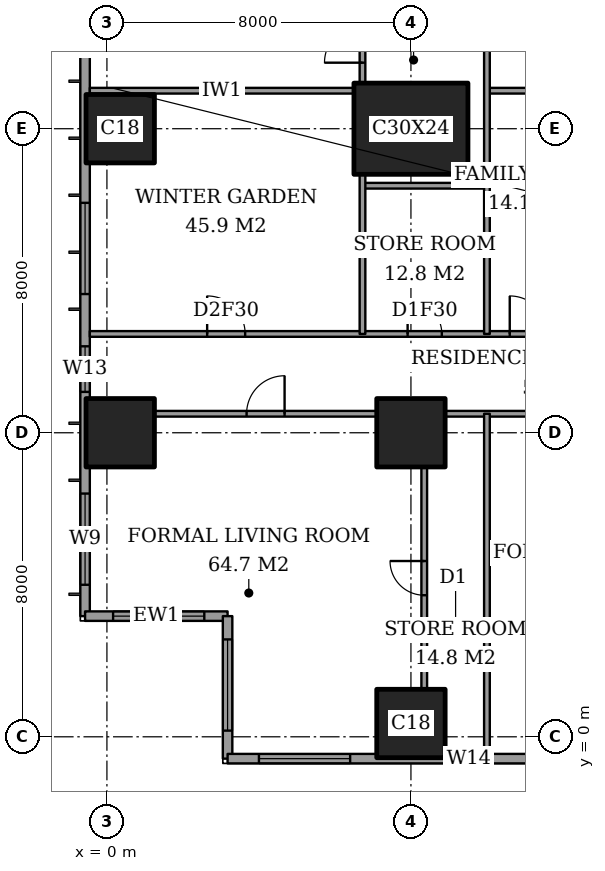
"""IFC4 building model, lengths in metres.
Left out: names, types, materials, properties, quantities, classifications, styles, units other than length and angle.
Written with IfcOpenShell. Run it as: python <this file> out.ifc"""

import sys

from ifc_helpers import new_model, si_unit, direction, frame, frame_2d, origin, origin_2d, place, context, subcontext, project, spatial, rectangle, extrude, element, fill, save


model = new_model("IFC4")
c1 = context("Model", 3, precision=1e-05, world=origin(), true_north=direction((0.0, 1.0)))
c2 = subcontext(c1, "Body", "Model", "MODEL_VIEW")
j1 = project(units=[si_unit("LENGTHUNIT", "METRE"), si_unit("PLANEANGLEUNIT", "RADIAN")], contexts=[c1])
p1 = place(None, origin())
s1 = spatial("IfcSite", under=j1, at=p1, CompositionType="ELEMENT")
p2 = place(p1, origin())
s2 = spatial("IfcBuilding", under=s1, at=p2, CompositionType="ELEMENT")
p3 = place(p2, frame((0.0, 0.0, 203.8)))
s3 = spatial("IfcBuildingStorey", under=s2, at=p3, CompositionType="ELEMENT", Elevation=203.8)
for number, where, z_axis, x_axis in (
    (1, (0.35, 8.0, 0.0), (0.0, 0.0, 1.0), (1.0, 0.0, 0.0)),
    (2, (0.35, 16.0, 0.0), (0.0, 0.0, 1.0), (1.0, 0.0, 0.0)),
    (3, (8.0, 0.35, 0.0), (0.0, 0.0, 1.0), (1.0, 0.0, 0.0)),
    (4, (8.0, 8.0, 0.0), (0.0, 0.0, 1.0), (1.0, 0.0, 0.0)),
):
    element("IfcColumn", number, at=place(p3, frame(where, z_axis=z_axis, x_axis=x_axis)), inside=s3, PredefinedType="COLUMN", context=c2, shape_type="SweptSolid", body=[
        extrude(rectangle(XDim=1.8, YDim=1.8, at=origin_2d()), origin(), (0.0, 0.0, 1.0), 3.6),
    ])
p4 = place(p3, frame((8.0, 16.0, 0.0), z_axis=(0.0, 0.0, 1.0), x_axis=(1.0, 0.0, 0.0)))
e5 = element("IfcColumn", 5, at=p4, inside=s3, PredefinedType="COLUMN", context=c2, shape_type="SweptSolid", body=[
    extrude(rectangle(XDim=3.0, YDim=2.4, at=origin_2d()), origin(), (0.0, 0.0, 1.0), 3.6),
])
p5 = place(p3, frame((-0.575, 44.825, 0.0), z_axis=(0.0, 0.0, 1.0), x_axis=(0.0, -1.0, 0.0)))
e6 = element("IfcWall", 6, at=p5, inside=s3, PredefinedType="SOLIDWALL", context=c2, shape_type="SweptSolid", body=[
    extrude(rectangle(XDim=41.65, YDim=0.25, at=frame_2d((20.825, 0.0))), origin(), (0.0, 0.0, 1.0), 3.6),
])
p6 = place(p5, frame((0.825, 0.0, 0.2)))
e7 = element("IfcOpeningElement", 7, at=p6, cuts=e6, PredefinedType="OPENING", context=c2, shape_type="SweptSolid", body=[
    extrude(rectangle(XDim=2.4, YDim=2.4, at=frame_2d((1.2, 1.2))), frame((0.0, 0.135, 0.0), z_axis=(0.0, -1.0, 0.0), x_axis=(1.0, 0.0, 0.0)), (0.0, 0.0, 1.0), 0.27),
])
p7 = place(p5, frame((6.075, 0.0, 0.2)))
e8 = element("IfcOpeningElement", 8, at=p7, cuts=e6, PredefinedType="OPENING", context=c2, shape_type="SweptSolid", body=[
    extrude(rectangle(XDim=1.2, YDim=2.4, at=frame_2d((0.6, 1.2))), frame((0.0, 0.135, 0.0), z_axis=(0.0, -1.0, 0.0), x_axis=(1.0, 0.0, 0.0)), (0.0, 0.0, 1.0), 0.27),
])
p8 = place(p5, frame((8.575, 0.0, 0.2)))
e9 = element("IfcOpeningElement", 9, at=p8, cuts=e6, PredefinedType="OPENING", context=c2, shape_type="SweptSolid", body=[
    extrude(rectangle(XDim=2.4, YDim=2.4, at=frame_2d((1.2, 1.2))), frame((0.0, 0.135, 0.0), z_axis=(0.0, -1.0, 0.0), x_axis=(1.0, 0.0, 0.0)), (0.0, 0.0, 1.0), 0.27),
])
p9 = place(p5, frame((15.675, 0.0, 0.2)))
e10 = element("IfcOpeningElement", 10, at=p9, cuts=e6, PredefinedType="OPENING", context=c2, shape_type="SweptSolid", body=[
    extrude(rectangle(XDim=2.4, YDim=2.4, at=frame_2d((1.2, 1.2))), frame((0.0, 0.135, 0.0), z_axis=(0.0, -1.0, 0.0), x_axis=(1.0, 0.0, 0.0)), (0.0, 0.0, 1.0), 0.27),
])
p10 = place(p5, frame((23.575, 0.0, 0.2)))
e11 = element("IfcOpeningElement", 11, at=p10, cuts=e6, PredefinedType="OPENING", context=c2, shape_type="SweptSolid", body=[
    extrude(rectangle(XDim=2.4, YDim=2.4, at=frame_2d((1.2, 1.2))), frame((0.0, 0.135, 0.0), z_axis=(0.0, -1.0, 0.0), x_axis=(1.0, 0.0, 0.0)), (0.0, 0.0, 1.0), 0.27),
])
p11 = place(p5, frame((30.775, 0.0, 0.2)))
e12 = element("IfcOpeningElement", 12, at=p11, cuts=e6, PredefinedType="OPENING", context=c2, shape_type="SweptSolid", body=[
    extrude(rectangle(XDim=2.4, YDim=2.4, at=frame_2d((1.2, 1.2))), frame((0.0, 0.135, 0.0), z_axis=(0.0, -1.0, 0.0), x_axis=(1.0, 0.0, 0.0)), (0.0, 0.0, 1.0), 0.27),
])
p12 = place(p5, frame((34.55, 0.0, 0.2)))
e13 = element("IfcOpeningElement", 13, at=p12, cuts=e6, PredefinedType="OPENING", context=c2, shape_type="SweptSolid", body=[
    extrude(rectangle(XDim=1.2, YDim=2.4, at=frame_2d((0.6, 1.2))), frame((0.0, 0.135, 0.0), z_axis=(0.0, -1.0, 0.0), x_axis=(1.0, 0.0, 0.0)), (0.0, 0.0, 1.0), 0.27),
])
p13 = place(p5, frame((38.425, 0.0, 0.2)))
e14 = element("IfcOpeningElement", 14, at=p13, cuts=e6, PredefinedType="OPENING", context=c2, shape_type="SweptSolid", body=[
    extrude(rectangle(XDim=2.4, YDim=2.4, at=frame_2d((1.2, 1.2))), frame((0.0, 0.135, 0.0), z_axis=(0.0, -1.0, 0.0), x_axis=(1.0, 0.0, 0.0)), (0.0, 0.0, 1.0), 0.27),
])
p14 = place(p3, frame((-0.575, 3.175, 0.0), z_axis=(0.0, 0.0, 1.0), x_axis=(1.0, 0.0, 0.0)))
e15 = element("IfcWall", 15, at=p14, inside=s3, PredefinedType="SOLIDWALL", context=c2, shape_type="SweptSolid", body=[
    extrude(rectangle(XDim=3.75, YDim=0.25, at=frame_2d((1.875, 0.0))), origin(), (0.0, 0.0, 1.0), 3.6),
])
p15 = place(p14, frame((0.738, 0.0, 0.2)))
e16 = element("IfcOpeningElement", 16, at=p15, cuts=e15, PredefinedType="OPENING", context=c2, shape_type="SweptSolid", body=[
    extrude(rectangle(XDim=2.4, YDim=2.4, at=frame_2d((1.2, 1.2))), frame((0.0, 0.135, 0.0), z_axis=(0.0, -1.0, 0.0), x_axis=(1.0, 0.0, 0.0)), (0.0, 0.0, 1.0), 0.27),
])
p16 = place(p3, frame((3.175, 3.175, 0.0), z_axis=(0.0, 0.0, 1.0), x_axis=(0.0, -1.0, 0.0)))
e17 = element("IfcWall", 17, at=p16, inside=s3, PredefinedType="SOLIDWALL", context=c2, shape_type="SweptSolid", body=[
    extrude(rectangle(XDim=3.75, YDim=0.25, at=frame_2d((1.875, 0.0))), origin(), (0.0, 0.0, 1.0), 3.6),
])
p17 = place(p16, frame((0.613, 0.0, 0.2)))
e18 = element("IfcOpeningElement", 18, at=p17, cuts=e17, PredefinedType="OPENING", context=c2, shape_type="SweptSolid", body=[
    extrude(rectangle(XDim=2.4, YDim=2.4, at=frame_2d((1.2, 1.2))), frame((0.0, 0.135, 0.0), z_axis=(0.0, -1.0, 0.0), x_axis=(1.0, 0.0, 0.0)), (0.0, 0.0, 1.0), 0.27),
])
p18 = place(p3, frame((3.175, -0.575, 0.0), z_axis=(0.0, 0.0, 1.0), x_axis=(1.0, 0.0, 0.0)))
e19 = element("IfcWall", 19, at=p18, inside=s3, PredefinedType="SOLIDWALL", context=c2, shape_type="SweptSolid", body=[
    extrude(rectangle(XDim=21.4, YDim=0.25, at=frame_2d((10.7, 0.0))), origin(), (0.0, 0.0, 1.0), 3.6),
])
p19 = place(p18, frame((0.825, 0.0, 0.2)))
e20 = element("IfcOpeningElement", 20, at=p19, cuts=e19, PredefinedType="OPENING", context=c2, shape_type="SweptSolid", body=[
    extrude(rectangle(XDim=2.4, YDim=2.4, at=frame_2d((1.2, 1.2))), frame((0.0, 0.135, 0.0), z_axis=(0.0, -1.0, 0.0), x_axis=(1.0, 0.0, 0.0)), (0.0, 0.0, 1.0), 0.27),
])
p20 = place(p18, frame((6.05, 0.0, 0.2)))
e21 = element("IfcOpeningElement", 21, at=p20, cuts=e19, PredefinedType="OPENING", context=c2, shape_type="SweptSolid", body=[
    extrude(rectangle(XDim=0.6, YDim=2.4, at=frame_2d((0.3, 1.2))), frame((0.0, 0.135, 0.0), z_axis=(0.0, -1.0, 0.0), x_axis=(1.0, 0.0, 0.0)), (0.0, 0.0, 1.0), 0.27),
])
p21 = place(p18, frame((8.175, 0.0, 0.2)))
e22 = element("IfcOpeningElement", 22, at=p21, cuts=e19, PredefinedType="OPENING", context=c2, shape_type="SweptSolid", body=[
    extrude(rectangle(XDim=2.4, YDim=2.4, at=frame_2d((1.2, 1.2))), frame((0.0, 0.135, 0.0), z_axis=(0.0, -1.0, 0.0), x_axis=(1.0, 0.0, 0.0)), (0.0, 0.0, 1.0), 0.27),
])
p22 = place(p18, frame((14.525, 0.0, 0.2)))
e23 = element("IfcOpeningElement", 23, at=p22, cuts=e19, PredefinedType="OPENING", context=c2, shape_type="SweptSolid", body=[
    extrude(rectangle(XDim=1.2, YDim=2.4, at=frame_2d((0.6, 1.2))), frame((0.0, 0.135, 0.0), z_axis=(0.0, -1.0, 0.0), x_axis=(1.0, 0.0, 0.0)), (0.0, 0.0, 1.0), 0.27),
])
p23 = place(p18, frame((17.4, 0.0, 0.2)))
e24 = element("IfcOpeningElement", 24, at=p23, cuts=e19, PredefinedType="OPENING", context=c2, shape_type="SweptSolid", body=[
    extrude(rectangle(XDim=1.2, YDim=2.4, at=frame_2d((0.6, 1.2))), frame((0.0, 0.135, 0.0), z_axis=(0.0, -1.0, 0.0), x_axis=(1.0, 0.0, 0.0)), (0.0, 0.0, 1.0), 0.27),
])
p24 = place(p3, frame((1.25, 8.5, 0.0), z_axis=(0.0, 0.0, 1.0), x_axis=(1.0, 0.0, 0.0)))
e25 = element("IfcWall", 25, at=p24, inside=s3, PredefinedType="PARTITIONING", context=c2, shape_type="SweptSolid", body=[
    extrude(rectangle(XDim=5.85, YDim=0.15, at=frame_2d((2.925, 0.0))), origin(), (0.0, 0.0, 1.0), 3.35),
])
p25 = place(p24, frame((2.425, 0.0, 0.0)))
e26 = element("IfcOpeningElement", 26, at=p25, cuts=e25, PredefinedType="OPENING", context=c2, shape_type="SweptSolid", body=[
    extrude(rectangle(XDim=1.0, YDim=2.1, at=frame_2d((0.5, 1.05))), frame((0.0, 0.085, 0.0), z_axis=(0.0, -1.0, 0.0), x_axis=(1.0, 0.0, 0.0)), (0.0, 0.0, 1.0), 0.17),
])
p26 = place(p3, frame((8.9, 8.5, 0.0), z_axis=(0.0, 0.0, 1.0), x_axis=(1.0, 0.0, 0.0)))
e27 = element("IfcWall", 27, at=p26, inside=s3, PredefinedType="PARTITIONING", context=c2, shape_type="SweptSolid", body=[
    extrude(rectangle(XDim=6.2, YDim=0.15, at=frame_2d((3.1, 0.0))), origin(), (0.0, 0.0, 1.0), 3.35),
])
p27 = place(p26, frame((3.15, 0.0, 0.0)))
e28 = element("IfcOpeningElement", 28, at=p27, cuts=e27, PredefinedType="OPENING", context=c2, shape_type="SweptSolid", body=[
    extrude(rectangle(XDim=1.0, YDim=2.1, at=frame_2d((0.5, 1.05))), frame((0.0, 0.085, 0.0), z_axis=(0.0, -1.0, 0.0), x_axis=(1.0, 0.0, 0.0)), (0.0, 0.0, 1.0), 0.17),
])
p28 = place(p3, frame((-0.45, 10.6, 0.0), z_axis=(0.0, 0.0, 1.0), x_axis=(1.0, 0.0, 0.0)))
e29 = element("IfcWall", 29, at=p28, inside=s3, PredefinedType="PARTITIONING", context=c2, shape_type="SweptSolid", body=[
    extrude(rectangle(XDim=25.011, YDim=0.15, at=frame_2d((12.505, 0.0))), origin(), (0.0, 0.0, 1.0), 3.35),
])
p29 = place(p28, frame((13.25, 0.0, 0.0)))
e30 = element("IfcOpeningElement", 30, at=p29, cuts=e29, PredefinedType="OPENING", context=c2, shape_type="SweptSolid", body=[
    extrude(rectangle(XDim=1.0, YDim=2.1, at=frame_2d((0.5, 1.05))), frame((0.0, 0.085, 0.0), z_axis=(0.0, -1.0, 0.0), x_axis=(1.0, 0.0, 0.0)), (0.0, 0.0, 1.0), 0.17),
])
p30 = place(p28, frame((3.087, 0.0, 0.0)))
e31 = element("IfcOpeningElement", 31, at=p30, cuts=e29, PredefinedType="OPENING", context=c2, shape_type="SweptSolid", body=[
    extrude(rectangle(XDim=1.0, YDim=2.1, at=frame_2d((0.5, 1.05))), frame((0.0, 0.085, 0.0), z_axis=(0.0, -1.0, 0.0), x_axis=(1.0, 0.0, 0.0)), (0.0, 0.0, 1.0), 0.17),
])
p31 = place(p28, frame((8.363, 0.0, 0.0)))
e32 = element("IfcOpeningElement", 32, at=p31, cuts=e29, PredefinedType="OPENING", context=c2, shape_type="SweptSolid", body=[
    extrude(rectangle(XDim=0.9, YDim=2.1, at=frame_2d((0.45, 1.05))), frame((0.0, 0.085, 0.0), z_axis=(0.0, -1.0, 0.0), x_axis=(1.0, 0.0, 0.0)), (0.0, 0.0, 1.0), 0.17),
])
p32 = place(p28, frame((11.05, 0.0, 0.0)))
e33 = element("IfcOpeningElement", 33, at=p32, cuts=e29, PredefinedType="OPENING", context=c2, shape_type="SweptSolid", body=[
    extrude(rectangle(XDim=1.0, YDim=2.1, at=frame_2d((0.5, 1.05))), frame((0.0, 0.085, 0.0), z_axis=(0.0, -1.0, 0.0), x_axis=(1.0, 0.0, 0.0)), (0.0, 0.0, 1.0), 0.17),
])
p33 = place(p28, frame((16.15, 0.0, 0.0)))
e34 = element("IfcOpeningElement", 34, at=p33, cuts=e29, PredefinedType="OPENING", context=c2, shape_type="SweptSolid", body=[
    extrude(rectangle(XDim=1.0, YDim=2.1, at=frame_2d((0.5, 1.05))), frame((0.0, 0.085, 0.0), z_axis=(0.0, -1.0, 0.0), x_axis=(1.0, 0.0, 0.0)), (0.0, 0.0, 1.0), 0.17),
])
p34 = place(p28, frame((21.175, 0.0, 0.0)))
e35 = element("IfcOpeningElement", 35, at=p34, cuts=e29, PredefinedType="OPENING", context=c2, shape_type="SweptSolid", body=[
    extrude(rectangle(XDim=1.0, YDim=2.1, at=frame_2d((0.5, 1.05))), frame((0.0, 0.085, 0.0), z_axis=(0.0, -1.0, 0.0), x_axis=(1.0, 0.0, 0.0)), (0.0, 0.0, 1.0), 0.17),
])
p35 = place(p3, frame((6.725, 14.5, 0.0), z_axis=(0.0, 0.0, 1.0), x_axis=(1.0, 0.0, 0.0)))
e36 = element("IfcWall", 36, at=p35, inside=s3, PredefinedType="PARTITIONING", context=c2, shape_type="SweptSolid", body=[
    extrude(rectangle(XDim=3.275, YDim=0.15, at=frame_2d((1.637, 0.0))), origin(), (0.0, 0.0, 1.0), 3.35),
])
p36 = place(p3, frame((-0.45, 17.0, 0.0), z_axis=(0.0, 0.0, 1.0), x_axis=(1.0, 0.0, 0.0)))
e37 = element("IfcWall", 37, at=p36, inside=s3, PredefinedType="PARTITIONING", context=c2, shape_type="SweptSolid", body=[
    extrude(rectangle(XDim=6.95, YDim=0.15, at=frame_2d((3.475, 0.0))), origin(), (0.0, 0.0, 1.0), 3.35),
])
p37 = place(p3, frame((10.0, 17.0, 0.0), z_axis=(0.0, 0.0, 1.0), x_axis=(1.0, 0.0, 0.0)))
e38 = element("IfcWall", 38, at=p37, inside=s3, PredefinedType="PARTITIONING", context=c2, shape_type="SweptSolid", body=[
    extrude(rectangle(XDim=4.4, YDim=0.15, at=frame_2d((2.2, 0.0))), origin(), (0.0, 0.0, 1.0), 3.35),
])
p38 = place(p37, frame((2.8, 0.0, 0.0)))
e39 = element("IfcOpeningElement", 39, at=p38, cuts=e38, PredefinedType="OPENING", context=c2, shape_type="SweptSolid", body=[
    extrude(rectangle(XDim=1.0, YDim=2.1, at=frame_2d((0.5, 1.05))), frame((0.0, 0.085, 0.0), z_axis=(0.0, -1.0, 0.0), x_axis=(1.0, 0.0, 0.0)), (0.0, 0.0, 1.0), 0.17),
])
p39 = place(p3, frame((6.725, 10.6, 0.0), z_axis=(0.0, 0.0, 1.0), x_axis=(0.0, 1.0, 0.0)))
e40 = element("IfcWall", 40, at=p39, inside=s3, PredefinedType="PARTITIONING", context=c2, shape_type="SweptSolid", body=[
    extrude(rectangle(XDim=4.2, YDim=0.15, at=frame_2d((2.1, 0.0))), origin(), (0.0, 0.0, 1.0), 3.35),
])
p40 = place(p3, frame((6.725, 17.2, 0.0), z_axis=(0.0, 0.0, 1.0), x_axis=(0.0, 1.0, 0.0)))
e41 = element("IfcWall", 41, at=p40, inside=s3, PredefinedType="PARTITIONING", context=c2, shape_type="SweptSolid", body=[
    extrude(rectangle(XDim=2.45, YDim=0.15, at=frame_2d((1.225, 0.0))), origin(), (0.0, 0.0, 1.0), 3.35),
])
p41 = place(p40, frame((0.538, 0.0, 0.0)))
e42 = element("IfcOpeningElement", 42, at=p41, cuts=e41, PredefinedType="OPENING", context=c2, shape_type="SweptSolid", body=[
    extrude(rectangle(XDim=1.0, YDim=2.1, at=frame_2d((0.5, 1.05))), frame((0.0, 0.085, 0.0), z_axis=(0.0, -1.0, 0.0), x_axis=(1.0, 0.0, 0.0)), (0.0, 0.0, 1.0), 0.17),
])
p42 = place(p3, frame((8.35, 1.25, 0.0), z_axis=(0.0, 0.0, 1.0), x_axis=(0.0, 1.0, 0.0)))
e43 = element("IfcWall", 43, at=p42, inside=s3, PredefinedType="PARTITIONING", context=c2, shape_type="SweptSolid", body=[
    extrude(rectangle(XDim=5.85, YDim=0.15, at=frame_2d((2.925, 0.0))), origin(), (0.0, 0.0, 1.0), 3.35),
])
p43 = place(p42, frame((2.475, 0.0, 0.0)))
e44 = element("IfcOpeningElement", 44, at=p43, cuts=e43, PredefinedType="OPENING", context=c2, shape_type="SweptSolid", body=[
    extrude(rectangle(XDim=0.9, YDim=2.1, at=frame_2d((0.45, 1.05))), frame((0.0, 0.085, 0.0), z_axis=(0.0, -1.0, 0.0), x_axis=(1.0, 0.0, 0.0)), (0.0, 0.0, 1.0), 0.17),
])
p44 = place(p3, frame((10.0, -0.45, 0.0), z_axis=(0.0, 0.0, 1.0), x_axis=(0.0, 1.0, 0.0)))
e45 = element("IfcWall", 45, at=p44, inside=s3, PredefinedType="PARTITIONING", context=c2, shape_type="SweptSolid", body=[
    extrude(rectangle(XDim=8.95, YDim=0.15, at=frame_2d((4.475, 0.0))), origin(), (0.0, 0.0, 1.0), 3.35),
])
p45 = place(p3, frame((10.0, 10.6, 0.0), z_axis=(0.0, 0.0, 1.0), x_axis=(0.0, 1.0, 0.0)))
e46 = element("IfcWall", 46, at=p45, inside=s3, PredefinedType="PARTITIONING", context=c2, shape_type="SweptSolid", body=[
    extrude(rectangle(XDim=11.0, YDim=0.15, at=frame_2d((5.5, 0.0))), origin(), (0.0, 0.0, 1.0), 3.35),
])
p46 = place(p45, frame((8.2, 0.0, 0.0)))
e47 = element("IfcOpeningElement", 47, at=p46, cuts=e46, PredefinedType="OPENING", context=c2, shape_type="SweptSolid", body=[
    extrude(rectangle(XDim=1.0, YDim=2.1, at=frame_2d((0.5, 1.05))), frame((0.0, 0.085, 0.0), z_axis=(0.0, -1.0, 0.0), x_axis=(1.0, 0.0, 0.0)), (0.0, 0.0, 1.0), 0.17),
])
p47 = place(p11, origin())
e48 = element("IfcWindow", 48, at=p47, inside=s3, PartitioningType="SINGLE_PANEL", PredefinedType="WINDOW", context=c2, shape_type="SweptSolid", body=[
    extrude(rectangle(XDim=2.4, YDim=2.4, at=frame_2d((1.2, 1.2))), frame((0.0, 0.03, 0.0), z_axis=(0.0, -1.0, 0.0), x_axis=(1.0, 0.0, 0.0)), (0.0, 0.0, 1.0), 0.06),
])
fill(e12, e48)
p48 = place(p12, origin())
e49 = element("IfcWindow", 49, at=p48, inside=s3, PartitioningType="SINGLE_PANEL", PredefinedType="WINDOW", context=c2, shape_type="SweptSolid", body=[
    extrude(rectangle(XDim=1.2, YDim=2.4, at=frame_2d((0.6, 1.2))), frame((0.0, 0.03, 0.0), z_axis=(0.0, -1.0, 0.0), x_axis=(1.0, 0.0, 0.0)), (0.0, 0.0, 1.0), 0.06),
])
fill(e13, e49)
p49 = place(p13, origin())
e50 = element("IfcWindow", 50, at=p49, inside=s3, PartitioningType="SINGLE_PANEL", PredefinedType="WINDOW", context=c2, shape_type="SweptSolid", body=[
    extrude(rectangle(XDim=2.4, YDim=2.4, at=frame_2d((1.2, 1.2))), frame((0.0, 0.03, 0.0), z_axis=(0.0, -1.0, 0.0), x_axis=(1.0, 0.0, 0.0)), (0.0, 0.0, 1.0), 0.06),
])
fill(e14, e50)
p50 = place(p15, origin())
e51 = element("IfcWindow", 51, at=p50, inside=s3, PartitioningType="SINGLE_PANEL", PredefinedType="WINDOW", context=c2, shape_type="SweptSolid", body=[
    extrude(rectangle(XDim=2.4, YDim=2.4, at=frame_2d((1.2, 1.2))), frame((0.0, 0.03, 0.0), z_axis=(0.0, -1.0, 0.0), x_axis=(1.0, 0.0, 0.0)), (0.0, 0.0, 1.0), 0.06),
])
fill(e16, e51)
p51 = place(p17, origin())
e52 = element("IfcWindow", 52, at=p51, inside=s3, PartitioningType="SINGLE_PANEL", PredefinedType="WINDOW", context=c2, shape_type="SweptSolid", body=[
    extrude(rectangle(XDim=2.4, YDim=2.4, at=frame_2d((1.2, 1.2))), frame((0.0, 0.03, 0.0), z_axis=(0.0, -1.0, 0.0), x_axis=(1.0, 0.0, 0.0)), (0.0, 0.0, 1.0), 0.06),
])
fill(e18, e52)
p52 = place(p19, origin())
e53 = element("IfcWindow", 53, at=p52, inside=s3, PartitioningType="SINGLE_PANEL", PredefinedType="WINDOW", context=c2, shape_type="SweptSolid", body=[
    extrude(rectangle(XDim=2.4, YDim=2.4, at=frame_2d((1.2, 1.2))), frame((0.0, 0.03, 0.0), z_axis=(0.0, -1.0, 0.0), x_axis=(1.0, 0.0, 0.0)), (0.0, 0.0, 1.0), 0.06),
])
fill(e20, e53)
p53 = place(p20, origin())
e54 = element("IfcWindow", 54, at=p53, inside=s3, PartitioningType="SINGLE_PANEL", PredefinedType="WINDOW", context=c2, shape_type="SweptSolid", body=[
    extrude(rectangle(XDim=0.6, YDim=2.4, at=frame_2d((0.3, 1.2))), frame((0.0, 0.03, 0.0), z_axis=(0.0, -1.0, 0.0), x_axis=(1.0, 0.0, 0.0)), (0.0, 0.0, 1.0), 0.06),
])
fill(e21, e54)
p54 = place(p25, origin())
e55 = element("IfcDoor", 55, at=p54, inside=s3, OperationType="SINGLE_SWING_LEFT", PredefinedType="DOOR", context=c2, shape_type="SweptSolid", body=[
    extrude(rectangle(XDim=1.0, YDim=2.1, at=frame_2d((0.5, 1.05))), frame((0.0, 0.025, 0.0), z_axis=(0.0, -1.0, 0.0), x_axis=(1.0, 0.0, 0.0)), (0.0, 0.0, 1.0), 0.05),
])
fill(e26, e55)
p55 = place(p43, origin())
e56 = element("IfcDoor", 56, at=p55, inside=s3, OperationType="SINGLE_SWING_LEFT", PredefinedType="DOOR", context=c2, shape_type="SweptSolid", body=[
    extrude(rectangle(XDim=0.9, YDim=2.1, at=frame_2d((0.45, 1.05))), frame((0.0, 0.025, 0.0), z_axis=(0.0, -1.0, 0.0), x_axis=(1.0, 0.0, 0.0)), (0.0, 0.0, 1.0), 0.05),
])
fill(e44, e56)
p56 = place(p30, origin())
e57 = element("IfcDoor", 57, at=p56, inside=s3, OperationType="SINGLE_SWING_RIGHT", PredefinedType="DOOR", context=c2, shape_type="SweptSolid", body=[
    extrude(rectangle(XDim=1.0, YDim=2.1, at=frame_2d((0.5, 1.05))), frame((0.0, 0.025, 0.0), z_axis=(0.0, -1.0, 0.0), x_axis=(1.0, 0.0, 0.0)), (0.0, 0.0, 1.0), 0.05),
])
fill(e31, e57)
p57 = place(p41, origin())
e58 = element("IfcDoor", 58, at=p57, inside=s3, OperationType="SINGLE_SWING_RIGHT", PredefinedType="DOOR", context=c2, shape_type="SweptSolid", body=[
    extrude(rectangle(XDim=1.0, YDim=2.1, at=frame_2d((0.5, 1.05))), frame((0.0, 0.025, 0.0), z_axis=(0.0, -1.0, 0.0), x_axis=(1.0, 0.0, 0.0)), (0.0, 0.0, 1.0), 0.05),
])
fill(e42, e58)
p58 = place(p31, origin())
e59 = element("IfcDoor", 59, at=p58, inside=s3, OperationType="SINGLE_SWING_RIGHT", PredefinedType="DOOR", context=c2, shape_type="SweptSolid", body=[
    extrude(rectangle(XDim=0.9, YDim=2.1, at=frame_2d((0.45, 1.05))), frame((0.0, 0.025, 0.0), z_axis=(0.0, -1.0, 0.0), x_axis=(1.0, 0.0, 0.0)), (0.0, 0.0, 1.0), 0.05),
])
fill(e32, e59)
p59 = place(p32, origin())
e60 = element("IfcDoor", 60, at=p59, inside=s3, OperationType="SINGLE_SWING_RIGHT", PredefinedType="DOOR", context=c2, shape_type="SweptSolid", body=[
    extrude(rectangle(XDim=1.0, YDim=2.1, at=frame_2d((0.5, 1.05))), frame((0.0, 0.025, 0.0), z_axis=(0.0, -1.0, 0.0), x_axis=(1.0, 0.0, 0.0)), (0.0, 0.0, 1.0), 0.05),
])
fill(e33, e60)
save(model, sys.argv[1])
